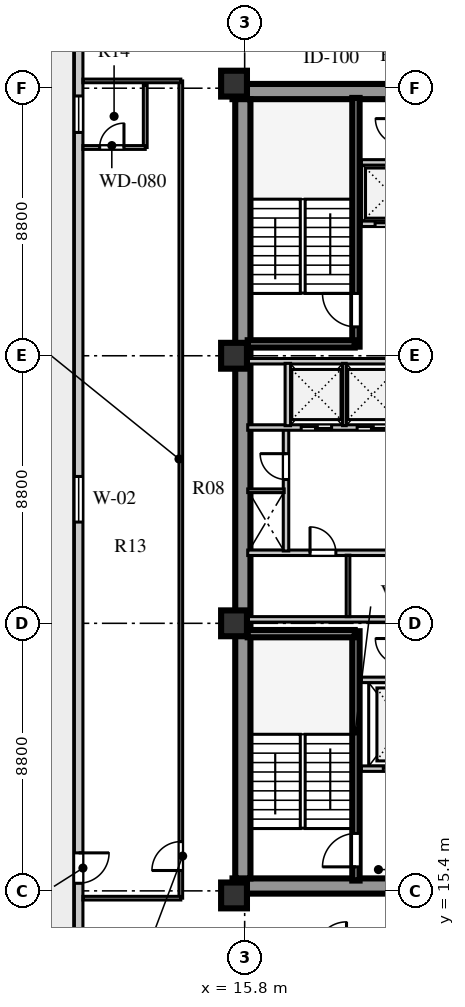
"""IFC4 building model, lengths in metres.
Left out: names, types, materials, properties, quantities, classifications, styles, units other than length and angle.
Written with IfcOpenShell. Run it as: python <this file> out.ifc"""

import sys

from ifc_helpers import new_model, si_unit, direction, frame, frame_2d, origin, origin_2d, place, context, subcontext, project, spatial, rectangle, extrude, element, fill, save


model = new_model("IFC4")
c1 = context("Model", 3, precision=1e-05, world=origin(), true_north=direction((0.0, 1.0)))
c2 = subcontext(c1, "Body", "Model", "MODEL_VIEW")
j1 = project(units=[si_unit("LENGTHUNIT", "METRE"), si_unit("PLANEANGLEUNIT", "RADIAN")], contexts=[c1])
p1 = place(None, origin())
s1 = spatial("IfcSite", under=j1, at=p1, CompositionType="ELEMENT")
p2 = place(p1, origin())
s2 = spatial("IfcBuilding", under=s1, at=p2, CompositionType="ELEMENT")
p3 = place(p2, frame((0.0, 0.0, 111.7)))
s3 = spatial("IfcBuildingStorey", under=s2, at=p3, CompositionType="ELEMENT", Elevation=111.7)
for number, where, z_axis, x_axis in (
    (1, (15.4, 15.56, 0.0), (0.0, 0.0, 1.0), (1.0, 0.0, 0.0)),
    (2, (15.4, 41.69, 0.0), (0.0, 0.0, 1.0), (1.0, 0.0, 0.0)),
):
    element("IfcWall", number, at=place(p3, frame(where, z_axis=z_axis, x_axis=x_axis)), inside=s3, PredefinedType="SHEAR", context=c2, shape_type="SweptSolid", body=[
        extrude(rectangle(XDim=9.68, YDim=0.5, at=frame_2d((4.84, 0.0))), origin(), (0.0, 0.0, 1.0), 3.6),
    ])
p4 = place(p3, frame((15.74, 15.81, 0.0), z_axis=(0.0, 0.0, 1.0), x_axis=(0.0, 1.0, 0.0)))
e3 = element("IfcWall", 3, at=p4, inside=s3, PredefinedType="SHEAR", context=c2, shape_type="SweptSolid", body=[
    extrude(rectangle(XDim=25.63, YDim=0.5, at=frame_2d((12.815, 0.0))), origin(), (0.0, 0.0, 1.0), 3.6),
])
for number, where, z_axis, x_axis in (
    (4, (15.45, 15.25, 0.0), (0.0, 0.0, 1.0), (1.0, 0.0, 0.0)),
    (5, (15.45, 24.2, 0.0), (0.0, 0.0, 1.0), (1.0, 0.0, 0.0)),
    (6, (15.45, 33.0, 0.0), (0.0, 0.0, 1.0), (1.0, 0.0, 0.0)),
    (7, (15.45, 41.95, 0.0), (0.0, 0.0, 1.0), (1.0, 0.0, 0.0)),
):
    element("IfcColumn", number, at=place(p3, frame(where, z_axis=z_axis, x_axis=x_axis)), inside=s3, PredefinedType="COLUMN", context=c2, shape_type="SweptSolid", body=[
        extrude(rectangle(XDim=0.85, YDim=0.85, at=origin_2d()), origin(), (0.0, 0.0, 1.0), 3.6),
    ])
p5 = place(p3, frame((10.34, 43.87, 0.0), z_axis=(0.0, 0.0, 1.0), x_axis=(0.0, -1.0, 0.0)))
e8 = element("IfcWall", 8, at=p5, inside=s3, PredefinedType="STANDARD", context=c2, shape_type="SweptSolid", body=[
    extrude(rectangle(XDim=30.54, YDim=0.28, at=frame_2d((15.27, 0.0))), origin(), (0.0, 0.0, 1.0), 3.6),
])
p6 = place(p5, frame((27.22, 0.0, 0.0)))
e9 = element("IfcOpeningElement", 9, at=p6, cuts=e8, PredefinedType="OPENING", context=c2, shape_type="SweptSolid", body=[
    extrude(rectangle(XDim=1.0, YDim=2.05, at=frame_2d((0.5, 1.025))), frame((0.0, 0.15, 0.0), z_axis=(0.0, -1.0, 0.0), x_axis=(1.0, 0.0, 0.0)), (0.0, 0.0, 1.0), 0.3),
])
p7 = place(p5, frame((14.84, 0.0, 0.8)))
e10 = element("IfcOpeningElement", 10, at=p7, cuts=e8, PredefinedType="OPENING", context=c2, shape_type="SweptSolid", body=[
    extrude(rectangle(XDim=1.5, YDim=2.0, at=frame_2d((0.75, 1.0))), frame((0.0, 0.15, 0.0), z_axis=(0.0, -1.0, 0.0), x_axis=(1.0, 0.0, 0.0)), (0.0, 0.0, 1.0), 0.3),
])
p8 = place(p5, frame((2.325, 0.0, 0.8)))
e11 = element("IfcOpeningElement", 11, at=p8, cuts=e8, PredefinedType="OPENING", context=c2, shape_type="SweptSolid", body=[
    extrude(rectangle(XDim=1.2, YDim=1.75, at=frame_2d((0.6, 0.875))), frame((0.0, 0.15, 0.0), z_axis=(0.0, -1.0, 0.0), x_axis=(1.0, 0.0, 0.0)), (0.0, 0.0, 1.0), 0.3),
])
p9 = place(p3, frame((19.46, 15.74, 0.0), z_axis=(0.0, 0.0, 1.0), x_axis=(0.0, 1.0, 0.0)))
e12 = element("IfcWall", 12, at=p9, inside=s3, PredefinedType="SHEAR", context=c2, shape_type="SweptSolid", body=[
    extrude(rectangle(XDim=8.2, YDim=0.24, at=frame_2d((4.1, 0.0))), origin(), (0.0, 0.0, 1.0), 3.85),
])
p10 = place(p9, frame((0.45, 0.0, 0.0)))
e13 = element("IfcOpeningElement", 13, at=p10, cuts=e12, PredefinedType="OPENING", context=c2, shape_type="SweptSolid", body=[
    extrude(rectangle(XDim=1.1, YDim=2.1, at=frame_2d((0.55, 1.05))), frame((0.0, 0.13, 0.0), z_axis=(0.0, -1.0, 0.0), x_axis=(1.0, 0.0, 0.0)), (0.0, 0.0, 1.0), 0.26),
])
p11 = place(p3, frame((15.9, 23.86, 0.0), z_axis=(0.0, 0.0, 1.0), x_axis=(1.0, 0.0, 0.0)))
e14 = element("IfcWall", 14, at=p11, inside=s3, PredefinedType="SHEAR", context=c2, shape_type="SweptSolid", body=[
    extrude(rectangle(XDim=3.52, YDim=0.24, at=frame_2d((1.76, 0.0))), origin(), (0.0, 0.0, 1.0), 3.85),
])
p12 = place(p3, frame((19.64, 19.42, 0.0), z_axis=(0.0, 0.0, 1.0), x_axis=(1.0, 0.0, 0.0)))
e15 = element("IfcWall", 15, at=p12, inside=s3, PredefinedType="SOLIDWALL", context=c2, shape_type="SweptSolid", body=[
    extrude(rectangle(XDim=4.94, YDim=0.18, at=frame_2d((2.47, 0.0))), origin(), (0.0, 0.0, 1.0), 3.6),
])
p13 = place(p12, frame((0.72, 0.0, 0.0)))
e16 = element("IfcOpeningElement", 16, at=p13, cuts=e15, PredefinedType="OPENING", context=c2, shape_type="SweptSolid", body=[
    extrude(rectangle(XDim=1.1, YDim=2.1, at=frame_2d((0.55, 1.05))), frame((0.0, 0.1, 0.0), z_axis=(0.0, -1.0, 0.0), x_axis=(1.0, 0.0, 0.0)), (0.0, 0.0, 1.0), 0.2),
])
p14 = place(p12, frame((3.02, 0.0, 0.0)))
e17 = element("IfcOpeningElement", 17, at=p14, cuts=e15, PredefinedType="OPENING", context=c2, shape_type="SweptSolid", body=[
    extrude(rectangle(XDim=1.1, YDim=2.1, at=frame_2d((0.55, 1.05))), frame((0.0, 0.1, 0.0), z_axis=(0.0, -1.0, 0.0), x_axis=(1.0, 0.0, 0.0)), (0.0, 0.0, 1.0), 0.2),
])
p15 = place(p3, frame((19.64, 22.34, 0.0), z_axis=(0.0, 0.0, 1.0), x_axis=(1.0, 0.0, 0.0)))
e18 = element("IfcWall", 18, at=p15, inside=s3, PredefinedType="SOLIDWALL", context=c2, shape_type="SweptSolid", body=[
    extrude(rectangle(XDim=4.94, YDim=0.18, at=frame_2d((2.47, 0.0))), origin(), (0.0, 0.0, 1.0), 3.6),
])
p16 = place(p3, frame((15.9, 26.52, 0.0), z_axis=(0.0, 0.0, 1.0), x_axis=(1.0, 0.0, 0.0)))
e19 = element("IfcWall", 19, at=p16, inside=s3, PredefinedType="SOLIDWALL", context=c2, shape_type="SweptSolid", body=[
    extrude(rectangle(XDim=8.68, YDim=0.18, at=frame_2d((4.34, 0.0))), origin(), (0.0, 0.0, 1.0), 3.6),
])
p17 = place(p16, frame((2.05, 0.0, 0.0)))
e20 = element("IfcOpeningElement", 20, at=p17, cuts=e19, PredefinedType="OPENING", context=c2, shape_type="SweptSolid", body=[
    extrude(rectangle(XDim=0.85, YDim=2.06, at=frame_2d((0.425, 1.03))), frame((0.0, 0.1, 0.0), z_axis=(0.0, -1.0, 0.0), x_axis=(1.0, 0.0, 0.0)), (0.0, 0.0, 1.0), 0.2),
])
p18 = place(p16, frame((5.2, 0.0, 0.0)))
e21 = element("IfcOpeningElement", 21, at=p18, cuts=e19, PredefinedType="OPENING", context=c2, shape_type="SweptSolid", body=[
    extrude(rectangle(XDim=0.95, YDim=2.1, at=frame_2d((0.475, 1.05))), frame((0.0, 0.1, 0.0), z_axis=(0.0, -1.0, 0.0), x_axis=(1.0, 0.0, 0.0)), (0.0, 0.0, 1.0), 0.2),
])
p19 = place(p3, frame((15.9, 24.33, 0.0), z_axis=(0.0, 0.0, 1.0), x_axis=(1.0, 0.0, 0.0)))
e22 = element("IfcWall", 22, at=p19, inside=s3, PredefinedType="SOLIDWALL", context=c2, shape_type="SweptSolid", body=[
    extrude(rectangle(XDim=8.68, YDim=0.18, at=frame_2d((4.34, 0.0))), origin(), (0.0, 0.0, 1.0), 2.95),
])
p20 = place(p3, frame((19.2, 24.42, 0.0), z_axis=(0.0, 0.0, 1.0), x_axis=(0.0, 1.0, 0.0)))
e23 = element("IfcWall", 23, at=p20, inside=s3, PredefinedType="PARTITIONING", context=c2, shape_type="SweptSolid", body=[
    extrude(rectangle(XDim=2.02, YDim=0.12, at=frame_2d((1.01, 0.0))), origin(), (0.0, 0.0, 1.0), 3.6),
])
p21 = place(p3, frame((17.16, 26.58, 0.0), z_axis=(0.0, 0.0, 1.0), x_axis=(0.0, 1.0, 0.0)))
e24 = element("IfcWall", 24, at=p21, inside=s3, PredefinedType="SOLIDWALL", context=c2, shape_type="SweptSolid", body=[
    extrude(rectangle(XDim=4.02, YDim=0.18, at=frame_2d((2.01, 0.0))), origin(), (0.0, 0.0, 1.0), 3.6),
])
p22 = place(p21, frame((2.35, 0.0, 0.0)))
e25 = element("IfcOpeningElement", 25, at=p22, cuts=e24, PredefinedType="OPENING", context=c2, shape_type="SweptSolid", body=[
    extrude(rectangle(XDim=0.85, YDim=2.06, at=frame_2d((0.425, 1.03))), frame((0.0, 0.1, 0.0), z_axis=(0.0, -1.0, 0.0), x_axis=(1.0, 0.0, 0.0)), (0.0, 0.0, 1.0), 0.2),
])
p23 = place(p3, frame((15.9, 28.56, 0.0), z_axis=(0.0, 0.0, 1.0), x_axis=(1.0, 0.0, 0.0)))
e26 = element("IfcWall", 26, at=p23, inside=s3, PredefinedType="PARTITIONING", context=c2, shape_type="SweptSolid", body=[
    extrude(rectangle(XDim=1.2, YDim=0.12, at=frame_2d((0.6, 0.0))), origin(), (0.0, 0.0, 1.0), 3.6),
])
p24 = place(p3, frame((15.9, 30.64, 0.0), z_axis=(0.0, 0.0, 1.0), x_axis=(1.0, 0.0, 0.0)))
e27 = element("IfcWall", 27, at=p24, inside=s3, PredefinedType="SOLIDWALL", context=c2, shape_type="SweptSolid", body=[
    extrude(rectangle(XDim=8.68, YDim=0.18, at=frame_2d((4.34, 0.0))), origin(), (0.0, 0.0, 1.0), 3.6),
])
p25 = place(p24, frame((1.76, 0.0, 0.0)))
e28 = element("IfcOpeningElement", 28, at=p25, cuts=e27, PredefinedType="OPENING", context=c2, shape_type="SweptSolid", body=[
    extrude(rectangle(XDim=1.0, YDim=2.1, at=frame_2d((0.5, 1.05))), frame((0.0, 0.1, 0.0), z_axis=(0.0, -1.0, 0.0), x_axis=(1.0, 0.0, 0.0)), (0.0, 0.0, 1.0), 0.2),
])
p26 = place(p24, frame((3.6, 0.0, 0.0)))
e29 = element("IfcOpeningElement", 29, at=p26, cuts=e27, PredefinedType="OPENING", context=c2, shape_type="SweptSolid", body=[
    extrude(rectangle(XDim=1.0, YDim=2.1, at=frame_2d((0.5, 1.05))), frame((0.0, 0.1, 0.0), z_axis=(0.0, -1.0, 0.0), x_axis=(1.0, 0.0, 0.0)), (0.0, 0.0, 1.0), 0.2),
])
p27 = place(p24, frame((5.44, 0.0, 0.0)))
e30 = element("IfcOpeningElement", 30, at=p27, cuts=e27, PredefinedType="OPENING", context=c2, shape_type="SweptSolid", body=[
    extrude(rectangle(XDim=1.0, YDim=2.1, at=frame_2d((0.5, 1.05))), frame((0.0, 0.1, 0.0), z_axis=(0.0, -1.0, 0.0), x_axis=(1.0, 0.0, 0.0)), (0.0, 0.0, 1.0), 0.2),
])
p28 = place(p24, frame((7.28, 0.0, 0.0)))
e31 = element("IfcOpeningElement", 31, at=p28, cuts=e27, PredefinedType="OPENING", context=c2, shape_type="SweptSolid", body=[
    extrude(rectangle(XDim=1.0, YDim=2.1, at=frame_2d((0.5, 1.05))), frame((0.0, 0.1, 0.0), z_axis=(0.0, -1.0, 0.0), x_axis=(1.0, 0.0, 0.0)), (0.0, 0.0, 1.0), 0.2),
])
p29 = place(p3, frame((15.9, 32.82, 0.0), z_axis=(0.0, 0.0, 1.0), x_axis=(1.0, 0.0, 0.0)))
e32 = element("IfcWall", 32, at=p29, inside=s3, PredefinedType="SOLIDWALL", context=c2, shape_type="SweptSolid", body=[
    extrude(rectangle(XDim=8.68, YDim=0.18, at=frame_2d((4.34, 0.0))), origin(), (0.0, 0.0, 1.0), 2.95),
])
p30 = place(p3, frame((17.22, 30.7, 0.0), z_axis=(0.0, 0.0, 1.0), x_axis=(0.0, 1.0, 0.0)))
e33 = element("IfcWall", 33, at=p30, inside=s3, PredefinedType="SOLIDWALL", context=c2, shape_type="SweptSolid", body=[
    extrude(rectangle(XDim=2.05, YDim=0.18, at=frame_2d((1.025, 0.0))), origin(), (0.0, 0.0, 1.0), 3.6),
])
p31 = place(p3, frame((19.08, 30.7, 0.0), z_axis=(0.0, 0.0, 1.0), x_axis=(0.0, 1.0, 0.0)))
e34 = element("IfcWall", 34, at=p31, inside=s3, PredefinedType="PARTITIONING", context=c2, shape_type="SweptSolid", body=[
    extrude(rectangle(XDim=2.05, YDim=0.12, at=frame_2d((1.025, 0.0))), origin(), (0.0, 0.0, 1.0), 3.6),
])
p32 = place(p3, frame((19.46, 33.3, 0.0), z_axis=(0.0, 0.0, 1.0), x_axis=(0.0, 1.0, 0.0)))
e35 = element("IfcWall", 35, at=p32, inside=s3, PredefinedType="SHEAR", context=c2, shape_type="SweptSolid", body=[
    extrude(rectangle(XDim=8.18, YDim=0.24, at=frame_2d((4.09, 0.0))), origin(), (0.0, 0.0, 1.0), 3.85),
])
p33 = place(p32, frame((0.65, 0.0, 0.0)))
e36 = element("IfcOpeningElement", 36, at=p33, cuts=e35, PredefinedType="OPENING", context=c2, shape_type="SweptSolid", body=[
    extrude(rectangle(XDim=1.1, YDim=2.1, at=frame_2d((0.55, 1.05))), frame((0.0, 0.13, 0.0), z_axis=(0.0, -1.0, 0.0), x_axis=(1.0, 0.0, 0.0)), (0.0, 0.0, 1.0), 0.26),
])
p34 = place(p3, frame((15.9, 33.39, 0.0), z_axis=(0.0, 0.0, 1.0), x_axis=(1.0, 0.0, 0.0)))
e37 = element("IfcWall", 37, at=p34, inside=s3, PredefinedType="SHEAR", context=c2, shape_type="SweptSolid", body=[
    extrude(rectangle(XDim=3.52, YDim=0.24, at=frame_2d((1.76, 0.0))), origin(), (0.0, 0.0, 1.0), 3.85),
])
p35 = place(p3, frame((19.64, 37.34, 0.0), z_axis=(0.0, 0.0, 1.0), x_axis=(1.0, 0.0, 0.0)))
e38 = element("IfcWall", 38, at=p35, inside=s3, PredefinedType="SOLIDWALL", context=c2, shape_type="SweptSolid", body=[
    extrude(rectangle(XDim=4.94, YDim=0.18, at=frame_2d((2.47, 0.0))), origin(), (0.0, 0.0, 1.0), 3.6),
])
p36 = place(p35, frame((0.45, 0.0, 0.0)))
e39 = element("IfcOpeningElement", 39, at=p36, cuts=e38, PredefinedType="OPENING", context=c2, shape_type="SweptSolid", body=[
    extrude(rectangle(XDim=1.0, YDim=2.1, at=frame_2d((0.5, 1.05))), frame((0.0, 0.1, 0.0), z_axis=(0.0, -1.0, 0.0), x_axis=(1.0, 0.0, 0.0)), (0.0, 0.0, 1.0), 0.2),
])
p37 = place(p35, frame((2.5, 0.0, 0.0)))
e40 = element("IfcOpeningElement", 40, at=p37, cuts=e38, PredefinedType="OPENING", context=c2, shape_type="SweptSolid", body=[
    extrude(rectangle(XDim=1.0, YDim=2.1, at=frame_2d((0.5, 1.05))), frame((0.0, 0.1, 0.0), z_axis=(0.0, -1.0, 0.0), x_axis=(1.0, 0.0, 0.0)), (0.0, 0.0, 1.0), 0.2),
])
p38 = place(p3, frame((19.64, 39.36, 0.0), z_axis=(0.0, 0.0, 1.0), x_axis=(1.0, 0.0, 0.0)))
e41 = element("IfcWall", 41, at=p38, inside=s3, PredefinedType="SOLIDWALL", context=c2, shape_type="SweptSolid", body=[
    extrude(rectangle(XDim=4.94, YDim=0.18, at=frame_2d((2.47, 0.0))), origin(), (0.0, 0.0, 1.0), 3.6),
])
p39 = place(p3, frame((13.7, 15.16, 0.0), z_axis=(0.0, 0.0, 1.0), x_axis=(0.0, 1.0, 0.0)))
e42 = element("IfcWall", 42, at=p39, inside=s3, PredefinedType="PARTITIONING", context=c2, shape_type="SweptSolid", body=[
    extrude(rectangle(XDim=26.88, YDim=0.12, at=frame_2d((13.44, 0.0))), origin(), (0.0, 0.0, 1.0), 3.6),
])
p40 = place(p39, frame((0.91, 0.0, 0.0)))
e43 = element("IfcOpeningElement", 43, at=p40, cuts=e42, PredefinedType="OPENING", context=c2, shape_type="SweptSolid", body=[
    extrude(rectangle(XDim=0.95, YDim=2.1, at=frame_2d((0.475, 1.05))), frame((0.0, 0.07, 0.0), z_axis=(0.0, -1.0, 0.0), x_axis=(1.0, 0.0, 0.0)), (0.0, 0.0, 1.0), 0.14),
])
for number, where, z_axis, x_axis in (
    (44, (10.48, 15.16, 0.0), (0.0, 0.0, 1.0), (1.0, 0.0, 0.0)),
    (45, (10.48, 42.04, 0.0), (0.0, 0.0, 1.0), (1.0, 0.0, 0.0)),
):
    element("IfcWall", number, at=place(p3, frame(where, z_axis=z_axis, x_axis=x_axis)), inside=s3, PredefinedType="PARTITIONING", context=c2, shape_type="SweptSolid", body=[
        extrude(rectangle(XDim=3.22, YDim=0.12, at=frame_2d((1.61, 0.0))), origin(), (0.0, 0.0, 1.0), 3.1),
    ])
p41 = place(p3, frame((12.53, 39.85, 0.0), z_axis=(0.0, 0.0, 1.0), x_axis=(0.0, 1.0, 0.0)))
e46 = element("IfcWall", 46, at=p41, inside=s3, PredefinedType="PLUMBINGWALL", context=c2, shape_type="SweptSolid", body=[
    extrude(rectangle(XDim=2.05, YDim=0.125, at=frame_2d((1.025, 0.0))), origin(), (0.0, 0.0, 1.0), 3.6),
])
p42 = place(p3, frame((10.48, 39.85, 0.0), z_axis=(0.0, 0.0, 1.0), x_axis=(1.0, 0.0, 0.0)))
e47 = element("IfcWall", 47, at=p42, inside=s3, PredefinedType="PLUMBINGWALL", context=c2, shape_type="SweptSolid", body=[
    extrude(rectangle(XDim=2.05, YDim=0.125, at=frame_2d((1.025, 0.0))), origin(), (0.0, 0.0, 1.0), 3.6),
])
p43 = place(p42, frame((0.55, 0.0, 0.0)))
e48 = element("IfcOpeningElement", 48, at=p43, cuts=e47, PredefinedType="OPENING", context=c2, shape_type="SweptSolid", body=[
    extrude(rectangle(XDim=0.8, YDim=2.05, at=frame_2d((0.4, 1.025))), frame((0.0, 0.073, 0.0), z_axis=(0.0, -1.0, 0.0), x_axis=(1.0, 0.0, 0.0)), (0.0, 0.0, 1.0), 0.145),
])
p44 = place(p6, frame((1.0, 0.0, 0.0), z_axis=(0.0, 0.0, 1.0), x_axis=(-1.0, 0.0, 0.0)))
e49 = element("IfcDoor", 49, at=p44, inside=s3, OperationType="SINGLE_SWING_RIGHT", PredefinedType="DOOR", context=c2, shape_type="SweptSolid", body=[
    extrude(rectangle(XDim=1.0, YDim=2.05, at=frame_2d((0.5, 1.025))), frame((0.0, 0.025, 0.0), z_axis=(0.0, -1.0, 0.0), x_axis=(1.0, 0.0, 0.0)), (0.0, 0.0, 1.0), 0.05),
])
fill(e9, e49)
p45 = place(p7, origin())
e50 = element("IfcWindow", 50, at=p45, inside=s3, PartitioningType="SINGLE_PANEL", PredefinedType="WINDOW", context=c2, shape_type="SweptSolid", body=[
    extrude(rectangle(XDim=1.5, YDim=2.0, at=frame_2d((0.75, 1.0))), frame((0.0, 0.03, 0.0), z_axis=(0.0, -1.0, 0.0), x_axis=(1.0, 0.0, 0.0)), (0.0, 0.0, 1.0), 0.06),
])
fill(e10, e50)
p46 = place(p8, origin())
e51 = element("IfcWindow", 51, at=p46, inside=s3, PartitioningType="SINGLE_PANEL", PredefinedType="WINDOW", context=c2, shape_type="SweptSolid", body=[
    extrude(rectangle(XDim=1.2, YDim=1.75, at=frame_2d((0.6, 0.875))), frame((0.0, 0.03, 0.0), z_axis=(0.0, -1.0, 0.0), x_axis=(1.0, 0.0, 0.0)), (0.0, 0.0, 1.0), 0.06),
])
fill(e11, e51)
p47 = place(p10, origin())
e52 = element("IfcDoor", 52, at=p47, inside=s3, OperationType="SINGLE_SWING_LEFT", PredefinedType="DOOR", context=c2, shape_type="SweptSolid", body=[
    extrude(rectangle(XDim=1.1, YDim=2.1, at=frame_2d((0.55, 1.05))), frame((0.0, 0.025, 0.0), z_axis=(0.0, -1.0, 0.0), x_axis=(1.0, 0.0, 0.0)), (0.0, 0.0, 1.0), 0.05),
])
fill(e13, e52)
p48 = place(p13, origin())
e53 = element("IfcDoor", 53, at=p48, inside=s3, OperationType="DOUBLE_DOOR_SLIDING", PredefinedType="DOOR", context=c2, shape_type="SweptSolid", body=[
    extrude(rectangle(XDim=1.1, YDim=2.1, at=frame_2d((0.55, 1.05))), frame((0.0, 0.025, 0.0), z_axis=(0.0, -1.0, 0.0), x_axis=(1.0, 0.0, 0.0)), (0.0, 0.0, 1.0), 0.05),
])
fill(e16, e53)
p49 = place(p17, origin())
e54 = element("IfcDoor", 54, at=p49, inside=s3, OperationType="SINGLE_SWING_LEFT", PredefinedType="DOOR", context=c2, shape_type="SweptSolid", body=[
    extrude(rectangle(XDim=0.85, YDim=2.06, at=frame_2d((0.425, 1.03))), frame((0.0, 0.025, 0.0), z_axis=(0.0, -1.0, 0.0), x_axis=(1.0, 0.0, 0.0)), (0.0, 0.0, 1.0), 0.05),
])
fill(e20, e54)
p50 = place(p22, origin())
e55 = element("IfcDoor", 55, at=p50, inside=s3, OperationType="SINGLE_SWING_RIGHT", PredefinedType="DOOR", context=c2, shape_type="SweptSolid", body=[
    extrude(rectangle(XDim=0.85, YDim=2.06, at=frame_2d((0.425, 1.03))), frame((0.0, 0.025, 0.0), z_axis=(0.0, -1.0, 0.0), x_axis=(1.0, 0.0, 0.0)), (0.0, 0.0, 1.0), 0.05),
])
fill(e25, e55)
p51 = place(p25, frame((1.0, 0.0, 0.0), z_axis=(0.0, 0.0, 1.0), x_axis=(-1.0, 0.0, 0.0)))
e56 = element("IfcDoor", 56, at=p51, inside=s3, OperationType="DOUBLE_DOOR_SLIDING", PredefinedType="DOOR", context=c2, shape_type="SweptSolid", body=[
    extrude(rectangle(XDim=1.0, YDim=2.1, at=frame_2d((0.5, 1.05))), frame((0.0, 0.025, 0.0), z_axis=(0.0, -1.0, 0.0), x_axis=(1.0, 0.0, 0.0)), (0.0, 0.0, 1.0), 0.05),
])
fill(e28, e56)
p52 = place(p26, frame((1.0, 0.0, 0.0), z_axis=(0.0, 0.0, 1.0), x_axis=(-1.0, 0.0, 0.0)))
e57 = element("IfcDoor", 57, at=p52, inside=s3, OperationType="DOUBLE_DOOR_SLIDING", PredefinedType="DOOR", context=c2, shape_type="SweptSolid", body=[
    extrude(rectangle(XDim=1.0, YDim=2.1, at=frame_2d((0.5, 1.05))), frame((0.0, 0.025, 0.0), z_axis=(0.0, -1.0, 0.0), x_axis=(1.0, 0.0, 0.0)), (0.0, 0.0, 1.0), 0.05),
])
fill(e29, e57)
p53 = place(p33, origin())
e58 = element("IfcDoor", 58, at=p53, inside=s3, OperationType="SINGLE_SWING_RIGHT", PredefinedType="DOOR", context=c2, shape_type="SweptSolid", body=[
    extrude(rectangle(XDim=1.1, YDim=2.1, at=frame_2d((0.55, 1.05))), frame((0.0, 0.025, 0.0), z_axis=(0.0, -1.0, 0.0), x_axis=(1.0, 0.0, 0.0)), (0.0, 0.0, 1.0), 0.05),
])
fill(e36, e58)
p54 = place(p36, frame((1.0, 0.0, 0.0), z_axis=(0.0, 0.0, 1.0), x_axis=(-1.0, 0.0, 0.0)))
e59 = element("IfcDoor", 59, at=p54, inside=s3, OperationType="DOUBLE_DOOR_SLIDING", PredefinedType="DOOR", context=c2, shape_type="SweptSolid", body=[
    extrude(rectangle(XDim=1.0, YDim=2.1, at=frame_2d((0.5, 1.05))), frame((0.0, 0.025, 0.0), z_axis=(0.0, -1.0, 0.0), x_axis=(1.0, 0.0, 0.0)), (0.0, 0.0, 1.0), 0.05),
])
fill(e39, e59)
p55 = place(p40, origin())
e60 = element("IfcDoor", 60, at=p55, inside=s3, OperationType="SINGLE_SWING_LEFT", PredefinedType="DOOR", context=c2, shape_type="SweptSolid", body=[
    extrude(rectangle(XDim=0.95, YDim=2.1, at=frame_2d((0.475, 1.05))), frame((0.0, 0.025, 0.0), z_axis=(0.0, -1.0, 0.0), x_axis=(1.0, 0.0, 0.0)), (0.0, 0.0, 1.0), 0.05),
])
fill(e43, e60)
p56 = place(p43, frame((0.8, 0.0, 0.0), z_axis=(0.0, 0.0, 1.0), x_axis=(-1.0, 0.0, 0.0)))
e61 = element("IfcDoor", 61, at=p56, inside=s3, OperationType="SINGLE_SWING_LEFT", PredefinedType="DOOR", context=c2, shape_type="SweptSolid", body=[
    extrude(rectangle(XDim=0.8, YDim=2.05, at=frame_2d((0.4, 1.025))), frame((0.0, 0.025, 0.0), z_axis=(0.0, -1.0, 0.0), x_axis=(1.0, 0.0, 0.0)), (0.0, 0.0, 1.0), 0.05),
])
fill(e48, e61)
save(model, sys.argv[1])
